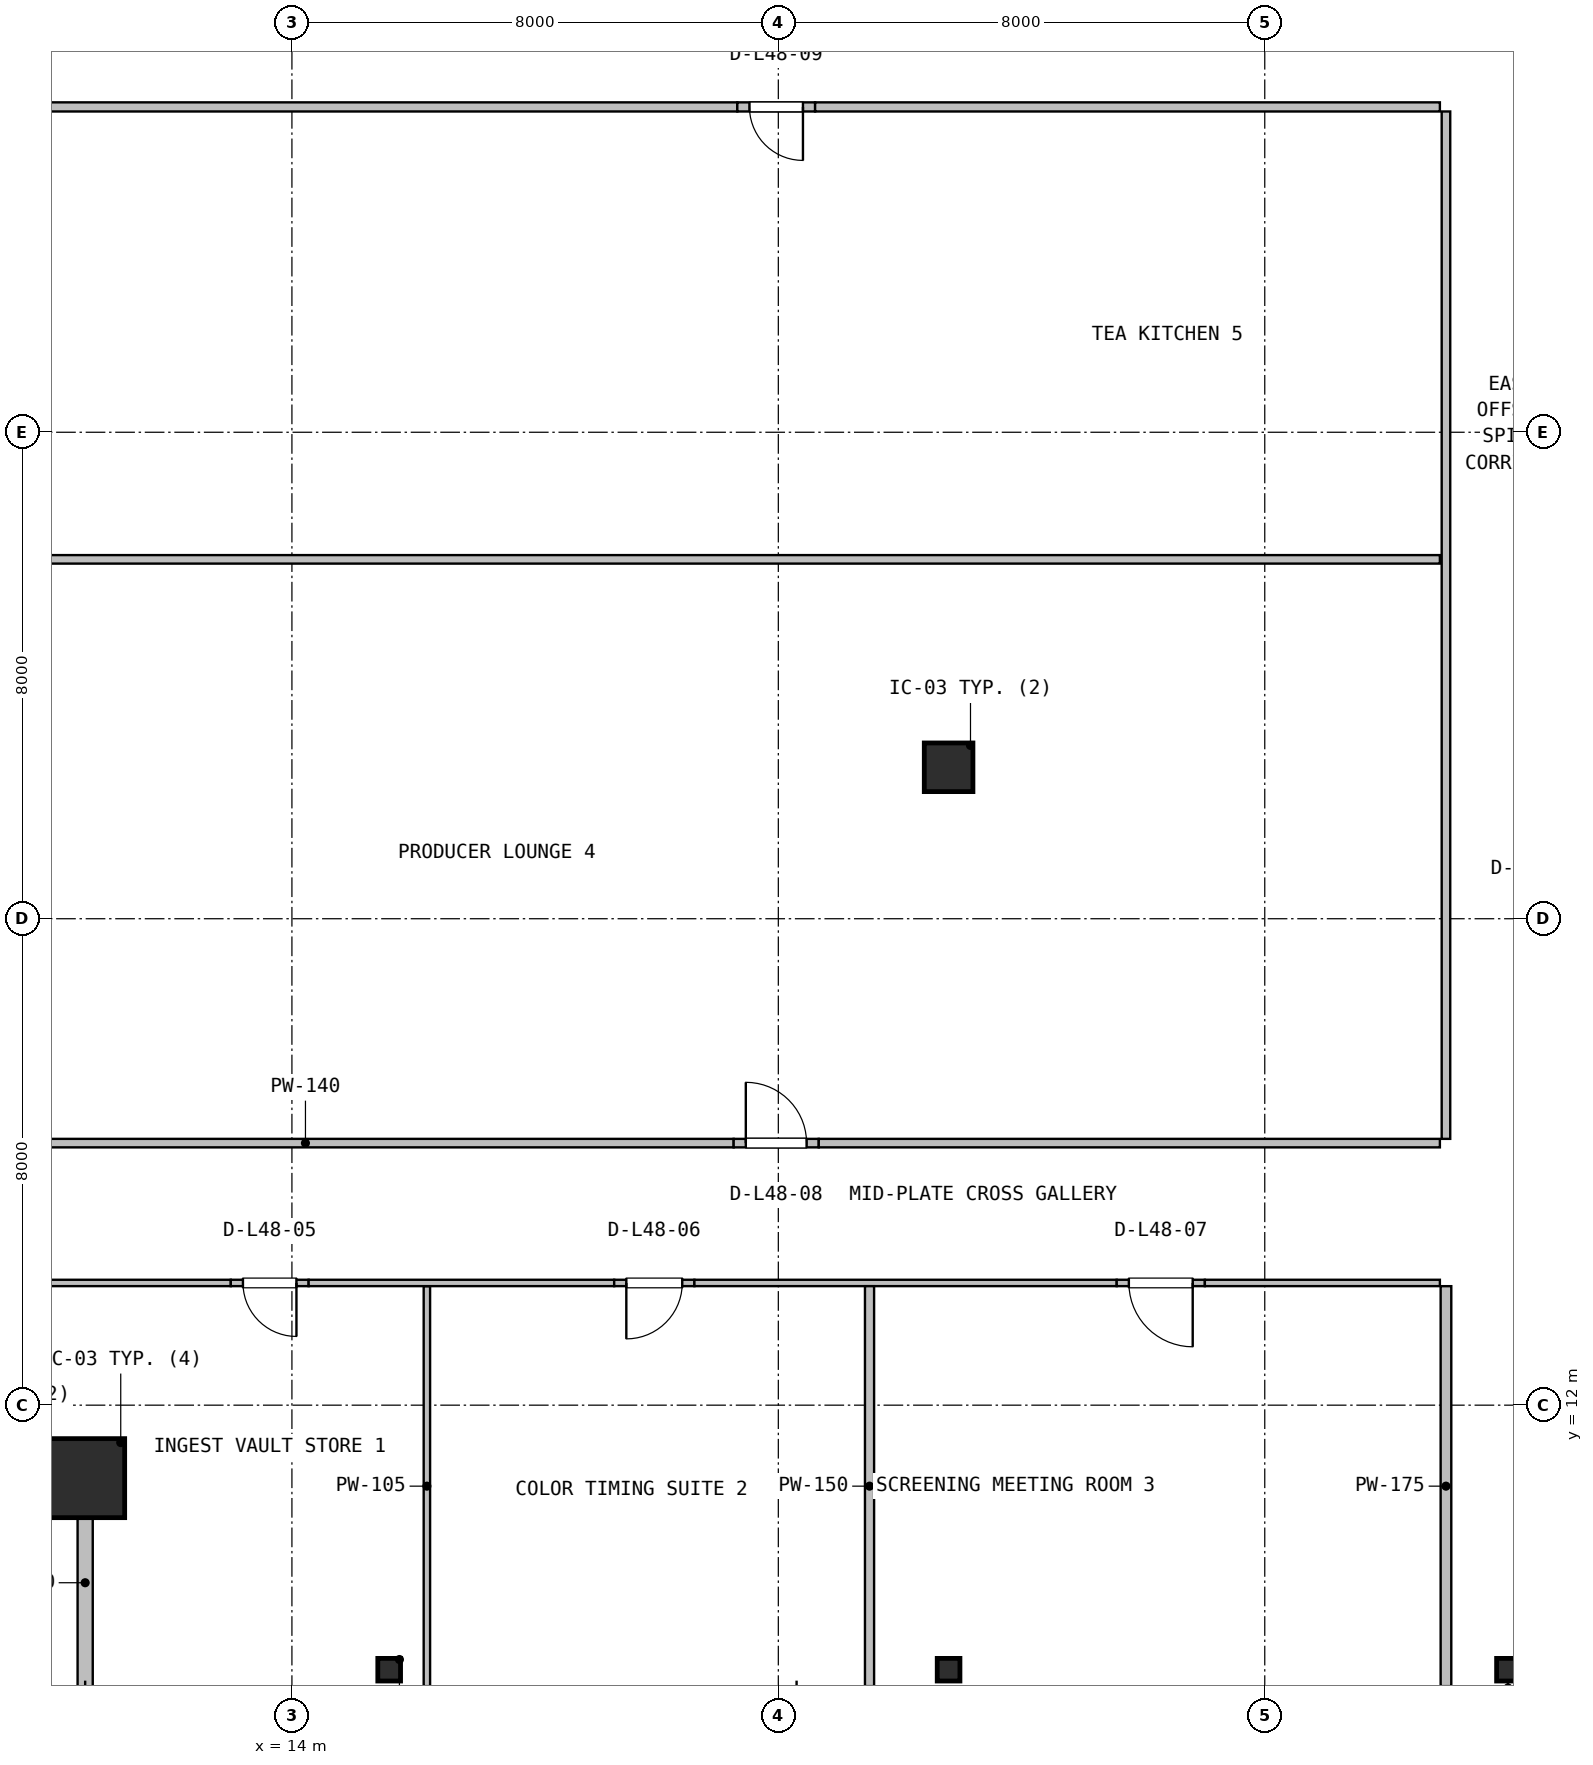
"""IFC4 building model, lengths in metres.
Left out: names, types, materials, properties, quantities, classifications, styles, units other than length and angle.
Written with IfcOpenShell. Run it as: python <this file> out.ifc"""

import sys

from ifc_helpers import new_model, si_unit, direction, frame, frame_2d, origin, origin_2d, place, context, subcontext, project, spatial, rectangle, hollow_rectangle, i_section, extrude, source, transform, mapped, element, fill, save


model = new_model("IFC4")
c1 = context("Model", 3, precision=1e-05, world=origin(), true_north=direction((0.0, 1.0)))
c2 = subcontext(c1, "Body", "Model", "MODEL_VIEW")
j1 = project(units=[si_unit("LENGTHUNIT", "METRE"), si_unit("PLANEANGLEUNIT", "RADIAN")], contexts=[c1])
p1 = place(None, origin())
s1 = spatial("IfcSite", under=j1, at=p1, CompositionType="ELEMENT")
p2 = place(p1, origin())
s2 = spatial("IfcBuilding", under=s1, at=p2, CompositionType="ELEMENT")
p3 = place(p2, frame((0.0, 0.0, 196.0)))
s3 = spatial("IfcBuildingStorey", under=s2, at=p3, CompositionType="ELEMENT", Elevation=196.0)
m1 = source(origin(), c2, "Body", "SweptSolid", [
    extrude(hollow_rectangle(XDim=1.3, YDim=1.3, WallThickness=0.05, at=origin_2d()), origin(), (0.0, 0.0, 1.0), 3.8),
])
p4 = place(p3, frame((10.6, 10.8, 0.0), z_axis=(0.0, 0.0, 1.0), x_axis=(1.0, 0.0, 0.0)))
e1 = element("IfcColumn", 1, at=p4, inside=s3, PredefinedType="COLUMN", context=c2, shape_type="MappedRepresentation", body=[
    mapped(m1, transform((0.0, 0.0, 0.0), x_axis=(1.0, 0.0, 0.0), y_axis=(0.0, 1.0, 0.0), z_axis=(0.0, 0.0, 1.0), scale=1.0)),
])
m2 = source(origin(), c2, "Body", "SweptSolid", [
    extrude(i_section(OverallWidth=0.374, OverallDepth=0.372, WebThickness=0.016, FlangeThickness=0.026, FilletRadius=0.016, at=origin_2d()), origin(), (0.0, 0.0, 1.0), 3.8),
])
for number, where, z_axis, x_axis in (
    (2, (15.6, 7.65, 0.0), (0.0, 0.0, 1.0), (1.0, 0.0, 0.0)),
    (3, (24.8, 7.65, 0.0), (0.0, 0.0, 1.0), (1.0, 0.0, 0.0)),
    (4, (34.0, 7.65, 0.0), (0.0, 0.0, 1.0), (1.0, 0.0, 0.0)),
):
    element("IfcColumn", number, at=place(p3, frame(where, z_axis=z_axis, x_axis=x_axis)), inside=s3, PredefinedType="COLUMN", context=c2, shape_type="MappedRepresentation", body=[
        mapped(m2, transform((0.0, 0.0, 0.0), x_axis=(1.0, 0.0, 0.0), y_axis=(0.0, 1.0, 0.0), z_axis=(0.0, 0.0, 1.0), scale=1.0)),
    ])
m3 = source(origin(), c2, "Body", "SweptSolid", [
    extrude(rectangle(XDim=0.8, YDim=0.8, at=origin_2d()), origin(), (0.0, 0.0, 1.0), 3.8),
])
p5 = place(p3, frame((24.8, 22.49, 0.0), z_axis=(0.0, 0.0, 1.0), x_axis=(1.0, 0.0, 0.0)))
e5 = element("IfcColumn", 5, at=p5, inside=s3, PredefinedType="COLUMN", context=c2, shape_type="MappedRepresentation", body=[
    mapped(m3, transform((0.0, 0.0, 0.0), x_axis=(1.0, 0.0, 0.0), y_axis=(0.0, 1.0, 0.0), z_axis=(0.0, 0.0, 1.0), scale=1.0)),
])
p6 = place(p3, frame((10.6, 7.28, 0.0), z_axis=(0.0, 0.0, 1.0), x_axis=(0.0, 1.0, 0.0)))
e6 = element("IfcWall", 6, at=p6, inside=s3, PredefinedType="SOLIDWALL", context=c2, shape_type="SweptSolid", body=[
    extrude(rectangle(XDim=3.6, YDim=0.25, at=frame_2d((1.8, 0.0))), origin(), (0.0, 0.0, 1.0), 1.925),
])
p7 = place(p3, frame((16.22, 7.38, 0.0), z_axis=(0.0, 0.0, 1.0), x_axis=(0.0, 1.0, 0.0)))
e7 = element("IfcWall", 7, at=p7, inside=s3, PredefinedType="PARTITIONING", context=c2, shape_type="SweptSolid", body=[
    extrude(rectangle(XDim=6.577, YDim=0.105, at=frame_2d((3.289, 0.0))), origin(), (0.0, 0.0, 1.0), 1.925),
])
p8 = place(p3, frame((7.18, 14.01, 0.0), z_axis=(0.0, 0.0, 1.0), x_axis=(1.0, 0.0, 0.0)))
e8 = element("IfcWall", 8, at=p8, inside=s3, PredefinedType="PARTITIONING", context=c2, shape_type="SweptSolid", body=[
    extrude(rectangle(XDim=5.815, YDim=0.105, at=frame_2d((2.908, 0.0))), origin(), (0.0, 0.0, 1.0), 1.925),
])
p9 = place(p3, frame((12.995, 14.01, 0.0), z_axis=(0.0, 0.0, 1.0), x_axis=(1.0, 0.0, 0.0)))
e9 = element("IfcWall", 9, at=p9, inside=s3, PredefinedType="PARTITIONING", context=c2, shape_type="SweptSolid", body=[
    extrude(rectangle(XDim=1.28, YDim=0.105, at=frame_2d((0.64, 0.0))), origin(), (0.0, 0.0, 1.0), 3.53),
])
p10 = place(p9, frame((0.2, 0.0, 0.0)))
e10 = element("IfcOpeningElement", 10, at=p10, cuts=e9, PredefinedType="OPENING", context=c2, shape_type="SweptSolid", body=[
    extrude(rectangle(XDim=0.88, YDim=2.06, at=frame_2d((0.44, 1.03))), frame((0.0, 0.062, 0.0), z_axis=(0.0, -1.0, 0.0), x_axis=(1.0, 0.0, 0.0)), (0.0, 0.0, 1.0), 0.125),
])
p11 = place(p3, frame((14.275, 14.01, 0.0), z_axis=(0.0, 0.0, 1.0), x_axis=(1.0, 0.0, 0.0)))
e11 = element("IfcWall", 11, at=p11, inside=s3, PredefinedType="PARTITIONING", context=c2, shape_type="SweptSolid", body=[
    extrude(rectangle(XDim=5.025, YDim=0.105, at=frame_2d((2.513, 0.0))), origin(), (0.0, 0.0, 1.0), 1.925),
])
p12 = place(p3, frame((19.3, 14.01, 0.0), z_axis=(0.0, 0.0, 1.0), x_axis=(1.0, 0.0, 0.0)))
e12 = element("IfcWall", 12, at=p12, inside=s3, PredefinedType="PARTITIONING", context=c2, shape_type="SweptSolid", body=[
    extrude(rectangle(XDim=1.32, YDim=0.105, at=frame_2d((0.66, 0.0))), origin(), (0.0, 0.0, 1.0), 3.53),
])
p13 = place(p12, frame((0.2, 0.0, 0.0)))
e13 = element("IfcOpeningElement", 13, at=p13, cuts=e12, PredefinedType="OPENING", context=c2, shape_type="SweptSolid", body=[
    extrude(rectangle(XDim=0.92, YDim=2.08, at=frame_2d((0.46, 1.04))), frame((0.0, 0.062, 0.0), z_axis=(0.0, -1.0, 0.0), x_axis=(1.0, 0.0, 0.0)), (0.0, 0.0, 1.0), 0.125),
])
p14 = place(p3, frame((20.62, 14.01, 0.0), z_axis=(0.0, 0.0, 1.0), x_axis=(1.0, 0.0, 0.0)))
e14 = element("IfcWall", 14, at=p14, inside=s3, PredefinedType="PARTITIONING", context=c2, shape_type="SweptSolid", body=[
    extrude(rectangle(XDim=6.945, YDim=0.105, at=frame_2d((3.472, 0.0))), origin(), (0.0, 0.0, 1.0), 1.925),
])
p15 = place(p3, frame((27.565, 14.01, 0.0), z_axis=(0.0, 0.0, 1.0), x_axis=(1.0, 0.0, 0.0)))
e15 = element("IfcWall", 15, at=p15, inside=s3, PredefinedType="PARTITIONING", context=c2, shape_type="SweptSolid", body=[
    extrude(rectangle(XDim=1.45, YDim=0.105, at=frame_2d((0.725, 0.0))), origin(), (0.0, 0.0, 1.0), 3.53),
])
p16 = place(p15, frame((0.2, 0.0, 0.0)))
e16 = element("IfcOpeningElement", 16, at=p16, cuts=e15, PredefinedType="OPENING", context=c2, shape_type="SweptSolid", body=[
    extrude(rectangle(XDim=1.05, YDim=2.1, at=frame_2d((0.525, 1.05))), frame((0.0, 0.062, 0.0), z_axis=(0.0, -1.0, 0.0), x_axis=(1.0, 0.0, 0.0)), (0.0, 0.0, 1.0), 0.125),
])
p17 = place(p3, frame((29.015, 14.01, 0.0), z_axis=(0.0, 0.0, 1.0), x_axis=(1.0, 0.0, 0.0)))
e17 = element("IfcWall", 17, at=p17, inside=s3, PredefinedType="PARTITIONING", context=c2, shape_type="SweptSolid", body=[
    extrude(rectangle(XDim=3.865, YDim=0.105, at=frame_2d((1.933, 0.0))), origin(), (0.0, 0.0, 1.0), 3.53),
])
p18 = place(p3, frame((23.5, 7.38, 0.0), z_axis=(0.0, 0.0, 1.0), x_axis=(0.0, 1.0, 0.0)))
e18 = element("IfcWall", 18, at=p18, inside=s3, PredefinedType="PARTITIONING", context=c2, shape_type="SweptSolid", body=[
    extrude(rectangle(XDim=6.577, YDim=0.15, at=frame_2d((3.289, 0.0))), origin(), (0.0, 0.0, 1.0), 1.925),
])
p19 = place(p3, frame((32.98, 7.38, 0.0), z_axis=(0.0, 0.0, 1.0), x_axis=(0.0, 1.0, 0.0)))
e19 = element("IfcWall", 19, at=p19, inside=s3, PredefinedType="PARTITIONING", context=c2, shape_type="SweptSolid", body=[
    extrude(rectangle(XDim=6.577, YDim=0.175, at=frame_2d((3.289, 0.0))), origin(), (0.0, 0.0, 1.0), 1.925),
])
p20 = place(p3, frame((7.18, 16.31, 0.0), z_axis=(0.0, 0.0, 1.0), x_axis=(1.0, 0.0, 0.0)))
e20 = element("IfcWall", 20, at=p20, inside=s3, PredefinedType="PARTITIONING", context=c2, shape_type="SweptSolid", body=[
    extrude(rectangle(XDim=14.085, YDim=0.14, at=frame_2d((7.042, 0.0))), origin(), (0.0, 0.0, 1.0), 1.925),
])
p21 = place(p3, frame((21.265, 16.31, 0.0), z_axis=(0.0, 0.0, 1.0), x_axis=(1.0, 0.0, 0.0)))
e21 = element("IfcWall", 21, at=p21, inside=s3, PredefinedType="PARTITIONING", context=c2, shape_type="SweptSolid", body=[
    extrude(rectangle(XDim=1.4, YDim=0.14, at=frame_2d((0.7, 0.0))), origin(), (0.0, 0.0, 1.0), 3.53),
])
p22 = place(p21, frame((0.2, 0.0, 0.0)))
e22 = element("IfcOpeningElement", 22, at=p22, cuts=e21, PredefinedType="OPENING", context=c2, shape_type="SweptSolid", body=[
    extrude(rectangle(XDim=1.0, YDim=2.1, at=frame_2d((0.5, 1.05))), frame((0.0, 0.08, 0.0), z_axis=(0.0, -1.0, 0.0), x_axis=(1.0, 0.0, 0.0)), (0.0, 0.0, 1.0), 0.16),
])
p23 = place(p3, frame((22.665, 16.31, 0.0), z_axis=(0.0, 0.0, 1.0), x_axis=(1.0, 0.0, 0.0)))
e23 = element("IfcWall", 23, at=p23, inside=s3, PredefinedType="PARTITIONING", context=c2, shape_type="SweptSolid", body=[
    extrude(rectangle(XDim=10.215, YDim=0.14, at=frame_2d((5.107, 0.0))), origin(), (0.0, 0.0, 1.0), 1.925),
])
p24 = place(p3, frame((32.98, 16.38, 0.0), z_axis=(0.0, 0.0, 1.0), x_axis=(0.0, 1.0, 0.0)))
e24 = element("IfcWall", 24, at=p24, inside=s3, PredefinedType="PARTITIONING", context=c2, shape_type="SweptSolid", body=[
    extrude(rectangle(XDim=16.895, YDim=0.14, at=frame_2d((8.448, 0.0))), origin(), (0.0, 0.0, 1.0), 1.925),
])
p25 = place(p3, frame((7.18, 25.91, 0.0), z_axis=(0.0, 0.0, 1.0), x_axis=(1.0, 0.0, 0.0)))
e25 = element("IfcWall", 25, at=p25, inside=s3, PredefinedType="PARTITIONING", context=c2, shape_type="SweptSolid", body=[
    extrude(rectangle(XDim=25.7, YDim=0.14, at=frame_2d((12.85, 0.0))), origin(), (0.0, 0.0, 1.0), 1.925),
])
p26 = place(p3, frame((7.18, 33.35, 0.0), z_axis=(0.0, 0.0, 1.0), x_axis=(1.0, 0.0, 0.0)))
e26 = element("IfcWall", 26, at=p26, inside=s3, PredefinedType="PARTITIONING", context=c2, shape_type="SweptSolid", body=[
    extrude(rectangle(XDim=14.145, YDim=0.15, at=frame_2d((7.073, 0.0))), origin(), (0.0, 0.0, 1.0), 1.925),
])
p27 = place(p3, frame((21.325, 33.35, 0.0), z_axis=(0.0, 0.0, 1.0), x_axis=(1.0, 0.0, 0.0)))
e27 = element("IfcWall", 27, at=p27, inside=s3, PredefinedType="PARTITIONING", context=c2, shape_type="SweptSolid", body=[
    extrude(rectangle(XDim=1.28, YDim=0.15, at=frame_2d((0.64, 0.0))), origin(), (0.0, 0.0, 1.0), 3.53),
])
p28 = place(p27, frame((0.2, 0.0, 0.0)))
e28 = element("IfcOpeningElement", 28, at=p28, cuts=e27, PredefinedType="OPENING", context=c2, shape_type="SweptSolid", body=[
    extrude(rectangle(XDim=0.88, YDim=2.06, at=frame_2d((0.44, 1.03))), frame((0.0, 0.085, 0.0), z_axis=(0.0, -1.0, 0.0), x_axis=(1.0, 0.0, 0.0)), (0.0, 0.0, 1.0), 0.17),
])
p29 = place(p3, frame((22.605, 33.35, 0.0), z_axis=(0.0, 0.0, 1.0), x_axis=(1.0, 0.0, 0.0)))
e29 = element("IfcWall", 29, at=p29, inside=s3, PredefinedType="PARTITIONING", context=c2, shape_type="SweptSolid", body=[
    extrude(rectangle(XDim=10.275, YDim=0.15, at=frame_2d((5.137, 0.0))), origin(), (0.0, 0.0, 1.0), 2.195),
])
m4 = source(origin(), c2, "Body", "SweptSolid", [
    extrude(rectangle(XDim=0.88, YDim=2.06, at=frame_2d((0.44, 1.03))), frame((0.0, 0.025, 0.0), z_axis=(0.0, -1.0, 0.0), x_axis=(1.0, 0.0, 0.0)), (0.0, 0.0, 1.0), 0.05),
])
p30 = place(p10, frame((0.88, 0.0, 0.0), z_axis=(0.0, 0.0, 1.0), x_axis=(-1.0, 0.0, 0.0)))
e30 = element("IfcDoor", 30, at=p30, inside=s3, OperationType="SINGLE_SWING_RIGHT", PredefinedType="DOOR", context=c2, shape_type="MappedRepresentation", body=[
    mapped(m4, transform((0.0, 0.0, 0.0), x_axis=(1.0, 0.0, 0.0), y_axis=(0.0, 1.0, 0.0), z_axis=(0.0, 0.0, 1.0), scale=1.0)),
])
fill(e10, e30)
m5 = source(origin(), c2, "Body", "SweptSolid", [
    extrude(rectangle(XDim=0.92, YDim=2.08, at=frame_2d((0.46, 1.04))), frame((0.0, 0.025, 0.0), z_axis=(0.0, -1.0, 0.0), x_axis=(1.0, 0.0, 0.0)), (0.0, 0.0, 1.0), 0.05),
])
p31 = place(p13, frame((0.92, 0.0, 0.0), z_axis=(0.0, 0.0, 1.0), x_axis=(-1.0, 0.0, 0.0)))
e31 = element("IfcDoor", 31, at=p31, inside=s3, OperationType="SINGLE_SWING_LEFT", PredefinedType="DOOR", context=c2, shape_type="MappedRepresentation", body=[
    mapped(m5, transform((0.0, 0.0, 0.0), x_axis=(1.0, 0.0, 0.0), y_axis=(0.0, 1.0, 0.0), z_axis=(0.0, 0.0, 1.0), scale=1.0)),
])
fill(e13, e31)
m6 = source(origin(), c2, "Body", "SweptSolid", [
    extrude(rectangle(XDim=1.05, YDim=2.1, at=frame_2d((0.525, 1.05))), frame((0.0, 0.025, 0.0), z_axis=(0.0, -1.0, 0.0), x_axis=(1.0, 0.0, 0.0)), (0.0, 0.0, 1.0), 0.05),
])
p32 = place(p16, frame((1.05, 0.0, 0.0), z_axis=(0.0, 0.0, 1.0), x_axis=(-1.0, 0.0, 0.0)))
e32 = element("IfcDoor", 32, at=p32, inside=s3, OperationType="SINGLE_SWING_RIGHT", PredefinedType="DOOR", context=c2, shape_type="MappedRepresentation", body=[
    mapped(m6, transform((0.0, 0.0, 0.0), x_axis=(1.0, 0.0, 0.0), y_axis=(0.0, 1.0, 0.0), z_axis=(0.0, 0.0, 1.0), scale=1.0)),
])
fill(e16, e32)
m7 = source(origin(), c2, "Body", "SweptSolid", [
    extrude(rectangle(XDim=1.0, YDim=2.1, at=frame_2d((0.5, 1.05))), frame((0.0, 0.025, 0.0), z_axis=(0.0, -1.0, 0.0), x_axis=(1.0, 0.0, 0.0)), (0.0, 0.0, 1.0), 0.05),
])
p33 = place(p22, origin())
e33 = element("IfcDoor", 33, at=p33, inside=s3, OperationType="SINGLE_SWING_LEFT", PredefinedType="DOOR", context=c2, shape_type="MappedRepresentation", body=[
    mapped(m7, transform((0.0, 0.0, 0.0), x_axis=(1.0, 0.0, 0.0), y_axis=(0.0, 1.0, 0.0), z_axis=(0.0, 0.0, 1.0), scale=1.0)),
])
fill(e22, e33)
p34 = place(p28, frame((0.88, 0.0, 0.0), z_axis=(0.0, 0.0, 1.0), x_axis=(-1.0, 0.0, 0.0)))
e34 = element("IfcDoor", 34, at=p34, inside=s3, OperationType="SINGLE_SWING_RIGHT", PredefinedType="DOOR", context=c2, shape_type="MappedRepresentation", body=[
    mapped(m4, transform((0.0, 0.0, 0.0), x_axis=(1.0, 0.0, 0.0), y_axis=(0.0, 1.0, 0.0), z_axis=(0.0, 0.0, 1.0), scale=1.0)),
])
fill(e28, e34)
save(model, sys.argv[1])
